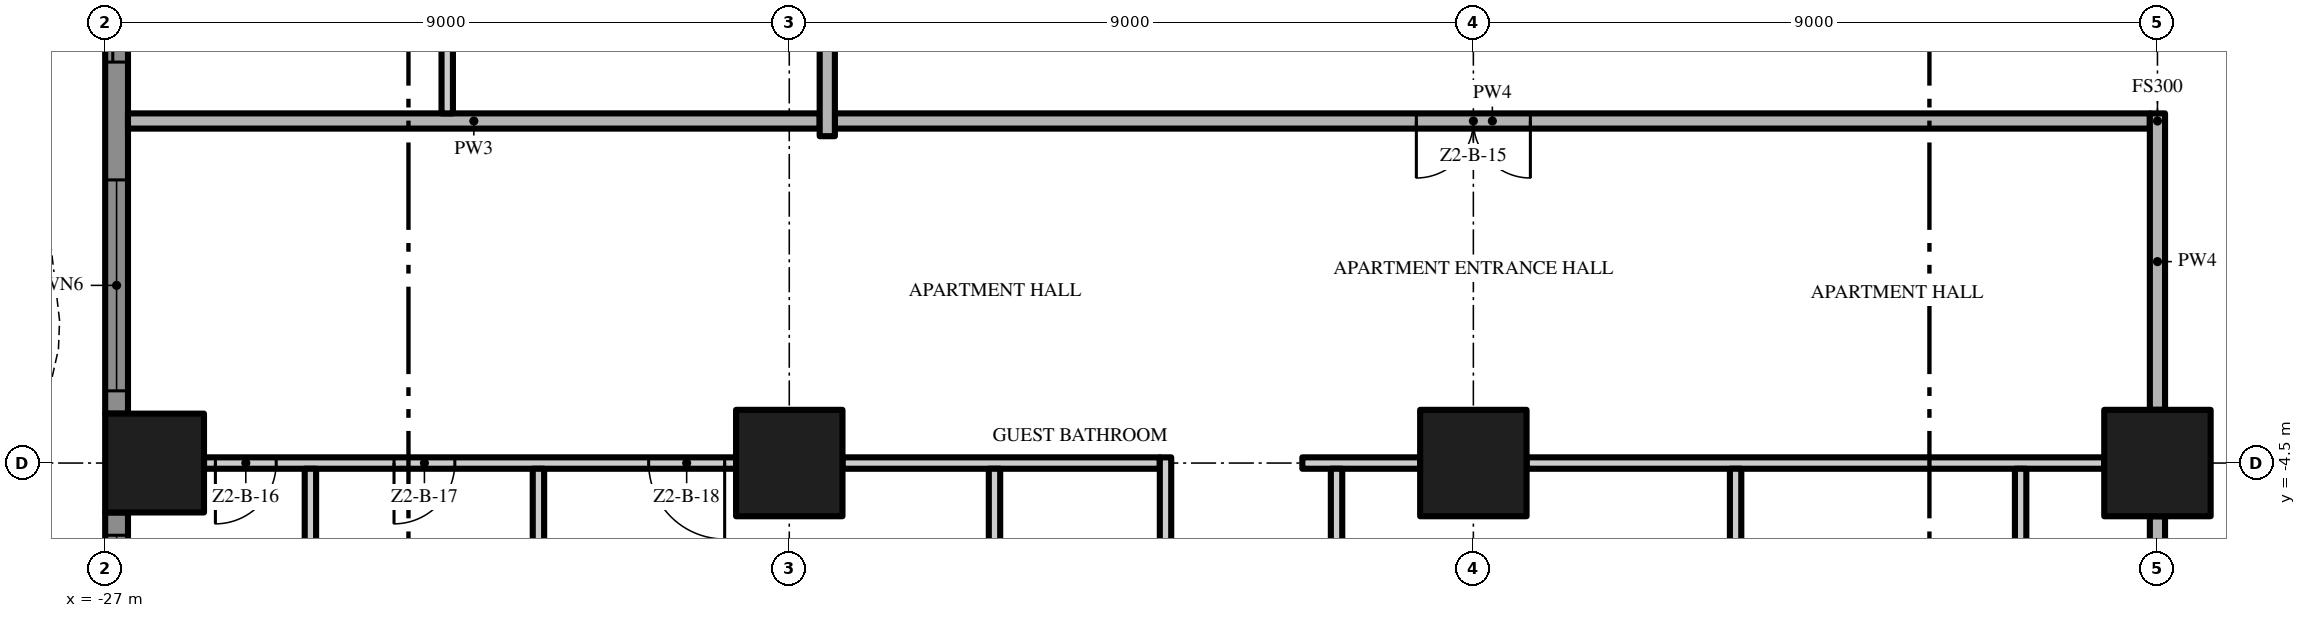
"""IFC4 building model, lengths in metres.
Left out: names, types, materials, properties, quantities, classifications, styles, units other than length and angle.
Written with IfcOpenShell. Run it as: python <this file> out.ifc"""

import sys

from ifc_helpers import new_model, si_unit, direction, frame, frame_2d, origin, origin_2d, place, context, subcontext, project, spatial, polyline, rectangle, outline, extrude, element, fill, save


model = new_model("IFC4")
c1 = context("Model", 3, precision=1e-05, world=origin(), true_north=direction((0.0, 1.0)))
c2 = subcontext(c1, "Body", "Model", "MODEL_VIEW")
j1 = project(units=[si_unit("LENGTHUNIT", "METRE"), si_unit("PLANEANGLEUNIT", "RADIAN")], contexts=[c1])
p1 = place(None, origin())
s1 = spatial("IfcSite", under=j1, at=p1, CompositionType="ELEMENT")
p2 = place(p1, origin())
s2 = spatial("IfcBuilding", under=s1, at=p2, CompositionType="ELEMENT")
p3 = place(p2, frame((0.0, 0.0, 88.4)))
s3 = spatial("IfcBuildingStorey", under=s2, at=p3, CompositionType="ELEMENT", Elevation=88.4)
p4 = place(p3, frame((-18.0, -4.5, 0.0), z_axis=(0.0, 0.0, 1.0), x_axis=(1.0, 0.0, 0.0)))
e1 = element("IfcColumn", 1, at=p4, inside=s3, PredefinedType="COLUMN", context=c2, shape_type="SweptSolid", body=[
    extrude(rectangle(XDim=1.4, YDim=1.4, at=origin_2d()), origin(), (0.0, 0.0, 1.0), 3.5),
])
p5 = place(p3, frame((-26.35, -4.5, 0.0), z_axis=(0.0, 0.0, 1.0), x_axis=(1.0, 0.0, 0.0)))
e2 = element("IfcColumn", 2, at=p5, inside=s3, PredefinedType="COLUMN", context=c2, shape_type="SweptSolid", body=[
    extrude(rectangle(XDim=1.3, YDim=1.3, at=origin_2d()), origin(), (0.0, 0.0, 1.0), 3.5),
])
for number, where, z_axis, x_axis in (
    (3, (-9.0, -4.5, 0.0), (0.0, 0.0, 1.0), (1.0, 0.0, 0.0)),
    (4, (0.0, -4.5, 0.0), (0.0, 0.0, 1.0), (1.0, 0.0, 0.0)),
):
    element("IfcColumn", number, at=place(p3, frame(where, z_axis=z_axis, x_axis=x_axis)), inside=s3, PredefinedType="COLUMN", context=c2, shape_type="SweptSolid", body=[
        extrude(rectangle(XDim=1.4, YDim=1.4, at=origin_2d()), origin(), (0.0, 0.0, 1.0), 3.5),
    ])
p6 = place(p3, frame((-26.85, -3.85, 0.0), z_axis=(0.0, 0.0, 1.0), x_axis=(0.0, 1.0, 0.0)))
e5 = element("IfcWall", 5, at=p6, inside=s3, PredefinedType="SOLIDWALL", context=c2, shape_type="SweptSolid", body=[
    extrude(rectangle(XDim=7.7, YDim=0.3, at=frame_2d((3.85, 0.0))), origin(), (0.0, 0.0, 1.0), 3.5),
])
p7 = place(p6, frame((4.625, 0.0, 0.0)))
e6 = element("IfcOpeningElement", 6, at=p7, cuts=e5, PredefinedType="OPENING", context=c2, shape_type="SweptSolid", body=[
    extrude(rectangle(XDim=2.775, YDim=2.4, at=frame_2d((1.387, 1.2))), frame((0.0, 0.16, 0.0), z_axis=(0.0, -1.0, 0.0), x_axis=(1.0, 0.0, 0.0)), (0.0, 0.0, 1.0), 0.32),
])
p8 = place(p6, frame((0.3, 0.0, 0.45)))
e7 = element("IfcOpeningElement", 7, at=p8, cuts=e5, PredefinedType="OPENING", context=c2, shape_type="SweptSolid", body=[
    extrude(rectangle(XDim=2.775, YDim=2.65, at=frame_2d((1.387, 1.325))), frame((0.0, 0.16, 0.0), z_axis=(0.0, -1.0, 0.0), x_axis=(1.0, 0.0, 0.0)), (0.0, 0.0, 1.0), 0.32),
])
p9 = place(p3, frame((-26.85, -12.85, 0.0), z_axis=(0.0, 0.0, 1.0), x_axis=(0.0, 1.0, 0.0)))
e8 = element("IfcWall", 8, at=p9, inside=s3, PredefinedType="SOLIDWALL", context=c2, shape_type="SweptSolid", body=[
    extrude(rectangle(XDim=7.7, YDim=0.3, at=frame_2d((3.85, 0.0))), origin(), (0.0, 0.0, 1.0), 3.5),
])
p10 = place(p9, frame((4.625, 0.0, 0.45)))
e9 = element("IfcOpeningElement", 9, at=p10, cuts=e8, PredefinedType="OPENING", context=c2, shape_type="SweptSolid", body=[
    extrude(rectangle(XDim=2.775, YDim=2.65, at=frame_2d((1.387, 1.325))), frame((0.0, 0.16, 0.0), z_axis=(0.0, -1.0, 0.0), x_axis=(1.0, 0.0, 0.0)), (0.0, 0.0, 1.0), 0.32),
])
p11 = place(p9, frame((0.3, 0.0, 0.0)))
e10 = element("IfcOpeningElement", 10, at=p11, cuts=e8, PredefinedType="OPENING", context=c2, shape_type="SweptSolid", body=[
    extrude(rectangle(XDim=2.775, YDim=2.4, at=frame_2d((1.387, 1.2))), frame((0.0, 0.16, 0.0), z_axis=(0.0, -1.0, 0.0), x_axis=(1.0, 0.0, 0.0)), (0.0, 0.0, 1.0), 0.32),
])
p12 = place(p3, origin())
e11 = element("IfcWall", 11, at=p12, inside=s3, PredefinedType="USERDEFINED", context=c2, shape_type="SweptSolid", body=[
    extrude(outline(polyline([(-29.649, 18.0), (-28.988, 16.5), (-28.255, 15.0), (-27.731, 13.5), (-27.6, 12.375), (-27.615, 12.0), (-27.951, 10.5), (-28.612, 9.0), (-29.345, 7.5), (-29.869, 6.0), (-30.0, 4.875), (-29.985, 4.5), (-29.649, 3.0), (-28.988, 1.5), (-28.255, 0.0), (-27.731, -1.5), (-27.6, -2.625), (-27.615, -3.0), (-27.951, -4.5), (-28.612, -6.0), (-29.345, -7.5), (-29.869, -9.0), (-30.0, -10.125), (-29.985, -10.5), (-29.649, -12.0), (-28.988, -13.5), (-28.255, -15.0), (-27.731, -16.5), (-27.6, -17.625), (-27.615, -18.0), (-27.365, -18.01), (-27.349, -17.615), (-27.486, -16.444), (-28.024, -14.904), (-28.761, -13.395), (-29.41, -11.921), (-29.736, -10.467), (-29.749, -10.135), (-29.624, -9.056), (-29.114, -7.596), (-28.385, -6.105), (-27.713, -4.579), (-27.366, -3.033), (-27.349, -2.615), (-27.486, -1.444), (-28.024, 0.096), (-28.761, 1.605), (-29.41, 3.079), (-29.736, 4.533), (-29.749, 4.865), (-29.624, 5.944), (-29.114, 7.404), (-28.385, 8.895), (-27.713, 10.421), (-27.366, 11.967), (-27.349, 12.385), (-27.486, 13.556), (-28.024, 15.096), (-28.761, 16.605), (-29.42, 18.101), (-29.649, 18.0)])), origin(), (0.0, 0.0, 1.0), 0.9),
])
p13 = place(p3, frame((-18.7, -4.5, 0.0), z_axis=(0.0, 0.0, 1.0), x_axis=(-1.0, 0.0, 0.0)))
e12 = element("IfcWall", 12, at=p13, inside=s3, PredefinedType="PARTITIONING", context=c2, shape_type="SweptSolid", body=[
    extrude(rectangle(XDim=7.0, YDim=0.15, at=frame_2d((3.5, 0.0))), origin(), (0.0, 0.0, 1.0), 3.5),
])
p14 = place(p13, frame((6.05, 0.0, 0.0)))
e13 = element("IfcOpeningElement", 13, at=p14, cuts=e12, PredefinedType="OPENING", context=c2, shape_type="SweptSolid", body=[
    extrude(rectangle(XDim=0.8, YDim=2.0, at=frame_2d((0.4, 1.0))), frame((0.0, 0.085, 0.0), z_axis=(0.0, -1.0, 0.0), x_axis=(1.0, 0.0, 0.0)), (0.0, 0.0, 1.0), 0.17),
])
p15 = place(p13, frame((3.7, 0.0, 0.0)))
e14 = element("IfcOpeningElement", 14, at=p15, cuts=e12, PredefinedType="OPENING", context=c2, shape_type="SweptSolid", body=[
    extrude(rectangle(XDim=0.8, YDim=2.0, at=frame_2d((0.4, 1.0))), frame((0.0, 0.085, 0.0), z_axis=(0.0, -1.0, 0.0), x_axis=(1.0, 0.0, 0.0)), (0.0, 0.0, 1.0), 0.17),
])
p16 = place(p13, frame((0.15, 0.0, 0.0)))
e15 = element("IfcOpeningElement", 15, at=p16, cuts=e12, PredefinedType="OPENING", context=c2, shape_type="SweptSolid", body=[
    extrude(rectangle(XDim=1.0, YDim=2.4, at=frame_2d((0.5, 1.2))), frame((0.0, 0.085, 0.0), z_axis=(0.0, -1.0, 0.0), x_axis=(1.0, 0.0, 0.0)), (0.0, 0.0, 1.0), 0.17),
])
p17 = place(p3, frame((-17.3, -4.5, 0.0), z_axis=(0.0, 0.0, 1.0), x_axis=(1.0, 0.0, 0.0)))
e16 = element("IfcWall", 16, at=p17, inside=s3, PredefinedType="PARTITIONING", context=c2, shape_type="SweptSolid", body=[
    extrude(rectangle(XDim=4.175, YDim=0.15, at=frame_2d((2.087, 0.0))), origin(), (0.0, 0.0, 1.0), 3.5),
])
p18 = place(p3, frame((-11.25, -4.5, 0.0), z_axis=(0.0, 0.0, 1.0), x_axis=(1.0, 0.0, 0.0)))
e17 = element("IfcWall", 17, at=p18, inside=s3, PredefinedType="PARTITIONING", context=c2, shape_type="SweptSolid", body=[
    extrude(rectangle(XDim=1.55, YDim=0.15, at=frame_2d((0.775, 0.0))), origin(), (0.0, 0.0, 1.0), 3.5),
])
p19 = place(p3, frame((-8.3, -4.5, 0.0), z_axis=(0.0, 0.0, 1.0), x_axis=(1.0, 0.0, 0.0)))
e18 = element("IfcWall", 18, at=p19, inside=s3, PredefinedType="PARTITIONING", context=c2, shape_type="SweptSolid", body=[
    extrude(rectangle(XDim=7.6, YDim=0.15, at=frame_2d((3.8, 0.0))), origin(), (0.0, 0.0, 1.0), 3.5),
])
p20 = place(p3, frame((-0.1, 0.0, 0.0), z_axis=(0.0, 0.0, 1.0), x_axis=(-1.0, 0.0, 0.0)))
e19 = element("IfcWall", 19, at=p20, inside=s3, PredefinedType="PARTITIONING", context=c2, shape_type="SweptSolid", body=[
    extrude(rectangle(XDim=17.3, YDim=0.2, at=frame_2d((8.65, 0.0))), origin(), (0.0, 0.0, 1.0), 3.5),
])
p21 = place(p20, frame((8.15, 0.0, 0.0)))
e20 = element("IfcOpeningElement", 20, at=p21, cuts=e19, PredefinedType="OPENING", context=c2, shape_type="SweptSolid", body=[
    extrude(rectangle(XDim=1.5, YDim=2.4, at=frame_2d((0.75, 1.2))), frame((0.0, 0.11, 0.0), z_axis=(0.0, -1.0, 0.0), x_axis=(1.0, 0.0, 0.0)), (0.0, 0.0, 1.0), 0.22),
])
p22 = place(p3, frame((-26.7, 0.0, 0.0), z_axis=(0.0, 0.0, 1.0), x_axis=(1.0, 0.0, 0.0)))
e21 = element("IfcWall", 21, at=p22, inside=s3, PredefinedType="PARTITIONING", context=c2, shape_type="SweptSolid", body=[
    extrude(rectangle(XDim=9.1, YDim=0.2, at=frame_2d((4.55, 0.0))), origin(), (0.0, 0.0, 1.0), 3.5),
])
p23 = place(p3, frame((-24.3, -8.925, 0.0), z_axis=(0.0, 0.0, 1.0), x_axis=(0.0, 1.0, 0.0)))
e22 = element("IfcWall", 22, at=p23, inside=s3, PredefinedType="PARTITIONING", context=c2, shape_type="SweptSolid", body=[
    extrude(rectangle(XDim=4.35, YDim=0.15, at=frame_2d((2.175, 0.0))), origin(), (0.0, 0.0, 1.0), 3.5),
])
p24 = place(p3, frame((-22.5, 0.1, 0.0), z_axis=(0.0, 0.0, 1.0), x_axis=(0.0, 1.0, 0.0)))
e23 = element("IfcWall", 23, at=p24, inside=s3, PredefinedType="PARTITIONING", context=c2, shape_type="SweptSolid", body=[
    extrude(rectangle(XDim=17.25, YDim=0.15, at=frame_2d((8.625, 0.0))), origin(), (0.0, 0.0, 1.0), 3.5),
])
p25 = place(p24, frame((1.65, 0.0, 0.0)))
e24 = element("IfcOpeningElement", 24, at=p25, cuts=e23, PredefinedType="OPENING", context=c2, shape_type="SweptSolid", body=[
    extrude(rectangle(XDim=1.0, YDim=2.4, at=frame_2d((0.5, 1.2))), frame((0.0, 0.085, 0.0), z_axis=(0.0, -1.0, 0.0), x_axis=(1.0, 0.0, 0.0)), (0.0, 0.0, 1.0), 0.17),
])
p26 = place(p24, frame((5.0, 0.0, 0.0)))
e25 = element("IfcOpeningElement", 25, at=p26, cuts=e23, PredefinedType="OPENING", context=c2, shape_type="SweptSolid", body=[
    extrude(rectangle(XDim=1.0, YDim=2.4, at=frame_2d((0.5, 1.2))), frame((0.0, 0.085, 0.0), z_axis=(0.0, -1.0, 0.0), x_axis=(1.0, 0.0, 0.0)), (0.0, 0.0, 1.0), 0.17),
])
p27 = place(p24, frame((11.75, 0.0, 0.0)))
e26 = element("IfcOpeningElement", 26, at=p27, cuts=e23, PredefinedType="OPENING", context=c2, shape_type="SweptSolid", body=[
    extrude(rectangle(XDim=1.0, YDim=2.4, at=frame_2d((0.5, 1.2))), frame((0.0, 0.085, 0.0), z_axis=(0.0, -1.0, 0.0), x_axis=(1.0, 0.0, 0.0)), (0.0, 0.0, 1.0), 0.17),
])
p28 = place(p24, frame((16.1, 0.0, 0.0)))
e27 = element("IfcOpeningElement", 27, at=p28, cuts=e23, PredefinedType="OPENING", context=c2, shape_type="SweptSolid", body=[
    extrude(rectangle(XDim=1.0, YDim=2.4, at=frame_2d((0.5, 1.2))), frame((0.0, 0.085, 0.0), z_axis=(0.0, -1.0, 0.0), x_axis=(1.0, 0.0, 0.0)), (0.0, 0.0, 1.0), 0.17),
])
p29 = place(p3, frame((-21.3, -8.925, 0.0), z_axis=(0.0, 0.0, 1.0), x_axis=(0.0, 1.0, 0.0)))
e28 = element("IfcWall", 28, at=p29, inside=s3, PredefinedType="PARTITIONING", context=c2, shape_type="SweptSolid", body=[
    extrude(rectangle(XDim=4.35, YDim=0.15, at=frame_2d((2.175, 0.0))), origin(), (0.0, 0.0, 1.0), 3.5),
])
p30 = place(p3, frame((-17.5, -0.2, 0.0), z_axis=(0.0, 0.0, 1.0), x_axis=(0.0, 1.0, 0.0)))
e29 = element("IfcWall", 29, at=p30, inside=s3, PredefinedType="PARTITIONING", context=c2, shape_type="SweptSolid", body=[
    extrude(rectangle(XDim=4.0, YDim=0.2, at=frame_2d((2.0, 0.0))), origin(), (0.0, 0.0, 1.0), 3.5),
])
p31 = place(p3, frame((-15.3, -8.925, 0.0), z_axis=(0.0, 0.0, 1.0), x_axis=(0.0, 1.0, 0.0)))
e30 = element("IfcWall", 30, at=p31, inside=s3, PredefinedType="PARTITIONING", context=c2, shape_type="SweptSolid", body=[
    extrude(rectangle(XDim=4.35, YDim=0.15, at=frame_2d((2.175, 0.0))), origin(), (0.0, 0.0, 1.0), 3.5),
])
p32 = place(p3, frame((-13.05, -9.075, 0.0), z_axis=(0.0, 0.0, 1.0), x_axis=(0.0, 1.0, 0.0)))
e31 = element("IfcWall", 31, at=p32, inside=s3, PredefinedType="PARTITIONING", context=c2, shape_type="SweptSolid", body=[
    extrude(rectangle(XDim=4.65, YDim=0.15, at=frame_2d((2.325, 0.0))), origin(), (0.0, 0.0, 1.0), 3.5),
])
p33 = place(p32, frame((1.875, 0.0, 0.0)))
e32 = element("IfcOpeningElement", 32, at=p33, cuts=e31, PredefinedType="OPENING", context=c2, shape_type="SweptSolid", body=[
    extrude(rectangle(XDim=0.9, YDim=2.1, at=frame_2d((0.45, 1.05))), frame((0.0, 0.085, 0.0), z_axis=(0.0, -1.0, 0.0), x_axis=(1.0, 0.0, 0.0)), (0.0, 0.0, 1.0), 0.17),
])
p34 = place(p3, frame((-10.8, -9.075, 0.0), z_axis=(0.0, 0.0, 1.0), x_axis=(0.0, 1.0, 0.0)))
e33 = element("IfcWall", 33, at=p34, inside=s3, PredefinedType="PARTITIONING", context=c2, shape_type="SweptSolid", body=[
    extrude(rectangle(XDim=4.5, YDim=0.15, at=frame_2d((2.25, 0.0))), origin(), (0.0, 0.0, 1.0), 3.5),
])
p35 = place(p3, frame((-5.55, -4.575, 0.0), z_axis=(0.0, 0.0, 1.0), x_axis=(0.0, -1.0, 0.0)))
e34 = element("IfcWall", 34, at=p35, inside=s3, PredefinedType="PARTITIONING", context=c2, shape_type="SweptSolid", body=[
    extrude(rectangle(XDim=4.35, YDim=0.15, at=frame_2d((2.175, 0.0))), origin(), (0.0, 0.0, 1.0), 3.5),
])
p36 = place(p35, frame((1.7, 0.0, 0.0)))
e35 = element("IfcOpeningElement", 35, at=p36, cuts=e34, PredefinedType="OPENING", context=c2, shape_type="SweptSolid", body=[
    extrude(rectangle(XDim=0.9, YDim=2.1, at=frame_2d((0.45, 1.05))), frame((0.0, 0.085, 0.0), z_axis=(0.0, -1.0, 0.0), x_axis=(1.0, 0.0, 0.0)), (0.0, 0.0, 1.0), 0.17),
])
p37 = place(p3, frame((-1.8, -8.925, 0.0), z_axis=(0.0, 0.0, 1.0), x_axis=(0.0, 1.0, 0.0)))
e36 = element("IfcWall", 36, at=p37, inside=s3, PredefinedType="PARTITIONING", context=c2, shape_type="SweptSolid", body=[
    extrude(rectangle(XDim=4.35, YDim=0.15, at=frame_2d((2.175, 0.0))), origin(), (0.0, 0.0, 1.0), 3.5),
])
p38 = place(p3, frame((0.0, -12.8, 0.0), z_axis=(0.0, 0.0, 1.0), x_axis=(0.0, 1.0, 0.0)))
e37 = element("IfcWall", 37, at=p38, inside=s3, PredefinedType="PARTITIONING", context=c2, shape_type="SweptSolid", body=[
    extrude(rectangle(XDim=7.6, YDim=0.2, at=frame_2d((3.8, 0.0))), origin(), (0.0, 0.0, 1.0), 3.5),
])
p39 = place(p3, frame((0.0, -3.8, 0.0), z_axis=(0.0, 0.0, 1.0), x_axis=(0.0, 1.0, 0.0)))
e38 = element("IfcWall", 38, at=p39, inside=s3, PredefinedType="PARTITIONING", context=c2, shape_type="SweptSolid", body=[
    extrude(rectangle(XDim=3.9, YDim=0.2, at=frame_2d((1.95, 0.0))), origin(), (0.0, 0.0, 1.0), 3.5),
])
p40 = place(p7, origin())
e39 = element("IfcDoor", 39, at=p40, inside=s3, OperationType="SINGLE_SWING_LEFT", PredefinedType="DOOR", context=c2, shape_type="SweptSolid", body=[
    extrude(rectangle(XDim=2.775, YDim=2.4, at=frame_2d((1.387, 1.2))), frame((0.0, 0.025, 0.0), z_axis=(0.0, -1.0, 0.0), x_axis=(1.0, 0.0, 0.0)), (0.0, 0.0, 1.0), 0.05),
])
fill(e6, e39)
p41 = place(p8, origin())
e40 = element("IfcWindow", 40, at=p41, inside=s3, PartitioningType="SINGLE_PANEL", PredefinedType="WINDOW", context=c2, shape_type="SweptSolid", body=[
    extrude(rectangle(XDim=2.775, YDim=2.65, at=frame_2d((1.387, 1.325))), frame((0.0, 0.03, 0.0), z_axis=(0.0, -1.0, 0.0), x_axis=(1.0, 0.0, 0.0)), (0.0, 0.0, 1.0), 0.06),
])
fill(e7, e40)
p42 = place(p10, origin())
e41 = element("IfcWindow", 41, at=p42, inside=s3, PartitioningType="SINGLE_PANEL", PredefinedType="WINDOW", context=c2, shape_type="SweptSolid", body=[
    extrude(rectangle(XDim=2.775, YDim=2.65, at=frame_2d((1.387, 1.325))), frame((0.0, 0.03, 0.0), z_axis=(0.0, -1.0, 0.0), x_axis=(1.0, 0.0, 0.0)), (0.0, 0.0, 1.0), 0.06),
])
fill(e9, e41)
p43 = place(p21, origin())
e42 = element("IfcDoor", 42, at=p43, inside=s3, OperationType="DOUBLE_DOOR_SINGLE_SWING", PredefinedType="DOOR", context=c2, shape_type="SweptSolid", body=[
    extrude(rectangle(XDim=1.5, YDim=2.4, at=frame_2d((0.75, 1.2))), frame((0.0, 0.025, 0.0), z_axis=(0.0, -1.0, 0.0), x_axis=(1.0, 0.0, 0.0)), (0.0, 0.0, 1.0), 0.05),
])
fill(e20, e42)
p44 = place(p14, origin())
e43 = element("IfcDoor", 43, at=p44, inside=s3, OperationType="SINGLE_SWING_RIGHT", PredefinedType="DOOR", context=c2, shape_type="SweptSolid", body=[
    extrude(rectangle(XDim=0.8, YDim=2.0, at=frame_2d((0.4, 1.0))), frame((0.0, 0.025, 0.0), z_axis=(0.0, -1.0, 0.0), x_axis=(1.0, 0.0, 0.0)), (0.0, 0.0, 1.0), 0.05),
])
fill(e13, e43)
p45 = place(p15, origin())
e44 = element("IfcDoor", 44, at=p45, inside=s3, OperationType="SINGLE_SWING_RIGHT", PredefinedType="DOOR", context=c2, shape_type="SweptSolid", body=[
    extrude(rectangle(XDim=0.8, YDim=2.0, at=frame_2d((0.4, 1.0))), frame((0.0, 0.025, 0.0), z_axis=(0.0, -1.0, 0.0), x_axis=(1.0, 0.0, 0.0)), (0.0, 0.0, 1.0), 0.05),
])
fill(e14, e44)
p46 = place(p16, origin())
e45 = element("IfcDoor", 45, at=p46, inside=s3, OperationType="SINGLE_SWING_LEFT", PredefinedType="DOOR", context=c2, shape_type="SweptSolid", body=[
    extrude(rectangle(XDim=1.0, YDim=2.4, at=frame_2d((0.5, 1.2))), frame((0.0, 0.025, 0.0), z_axis=(0.0, -1.0, 0.0), x_axis=(1.0, 0.0, 0.0)), (0.0, 0.0, 1.0), 0.05),
])
fill(e15, e45)
save(model, sys.argv[1])
